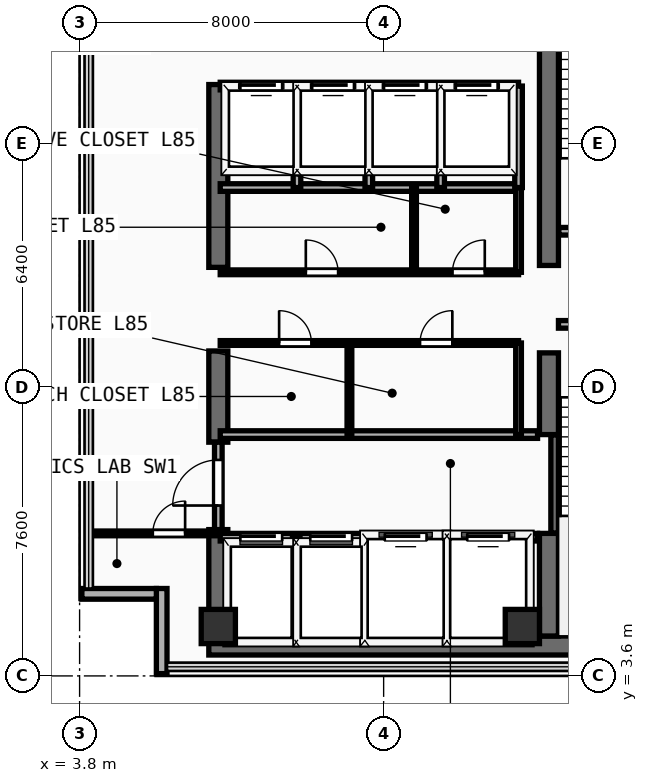
"""IFC4 building model, lengths in metres.
Left out: names, types, materials, properties, quantities, classifications, styles, units other than length and angle.
Written with IfcOpenShell. Run it as: python <this file> out.ifc"""

import sys

from ifc_helpers import new_model, si_unit, direction, frame, frame_2d, origin, origin_2d, place, context, subcontext, project, spatial, rectangle, extrude, element, fill, save


model = new_model("IFC4")
c1 = context("Model", 3, precision=1e-05, world=origin(), true_north=direction((0.0, 1.0)))
c2 = subcontext(c1, "Body", "Model", "MODEL_VIEW")
j1 = project(units=[si_unit("LENGTHUNIT", "METRE"), si_unit("PLANEANGLEUNIT", "RADIAN")], contexts=[c1])
p1 = place(None, origin())
s1 = spatial("IfcSite", under=j1, at=p1, CompositionType="ELEMENT")
p2 = place(p1, origin())
s2 = spatial("IfcBuilding", under=s1, at=p2, CompositionType="ELEMENT")
p3 = place(p2, frame((0.0, 0.0, 331.2)))
s3 = spatial("IfcBuildingStorey", under=s2, at=p3, CompositionType="ELEMENT", Elevation=331.2)
p4 = place(p3, frame((7.2, 4.4, 0.0), z_axis=(0.0, 0.0, 1.0), x_axis=(1.0, 0.0, 0.0)))
e1 = element("IfcWall", 1, at=p4, inside=s3, PredefinedType="SHEAR", context=c2, shape_type="SweptSolid", body=[
    extrude(rectangle(XDim=13.85, YDim=0.5, at=frame_2d((6.925, 0.0))), origin(), (0.0, 0.0, 1.0), 3.56),
])
p5 = place(p3, frame((7.45, 4.65, 0.0), z_axis=(0.0, 0.0, 1.0), x_axis=(0.0, 1.0, 0.0)))
e2 = element("IfcWall", 2, at=p5, inside=s3, PredefinedType="SHEAR", context=c2, shape_type="SweptSolid", body=[
    extrude(rectangle(XDim=2.8, YDim=0.5, at=frame_2d((1.4, 0.0))), origin(), (0.0, 0.0, 1.0), 3.56),
])
p6 = place(p3, frame((7.45, 9.75, 0.0), z_axis=(0.0, 0.0, 1.0), x_axis=(0.0, 1.0, 0.0)))
e3 = element("IfcWall", 3, at=p6, inside=s3, PredefinedType="SHEAR", context=c2, shape_type="SweptSolid", body=[
    extrude(rectangle(XDim=2.4, YDim=0.5, at=frame_2d((1.2, 0.0))), origin(), (0.0, 0.0, 1.0), 3.56),
])
p7 = place(p3, frame((7.45, 14.35, 0.0), z_axis=(0.0, 0.0, 1.0), x_axis=(0.0, 1.0, 0.0)))
e4 = element("IfcWall", 4, at=p7, inside=s3, PredefinedType="SHEAR", context=c2, shape_type="SweptSolid", body=[
    extrude(rectangle(XDim=4.81, YDim=0.5, at=frame_2d((2.405, 0.0))), origin(), (0.0, 0.0, 1.0), 3.56),
])
p8 = place(p3, frame((16.15, 4.65, 0.0), z_axis=(0.0, 0.0, 1.0), x_axis=(0.0, 1.0, 0.0)))
e5 = element("IfcWall", 5, at=p8, inside=s3, PredefinedType="SHEAR", context=c2, shape_type="SweptSolid", body=[
    extrude(rectangle(XDim=2.7, YDim=0.5, at=frame_2d((1.35, 0.0))), origin(), (0.0, 0.0, 1.0), 3.56),
])
p9 = place(p3, frame((16.15, 9.95, 0.0), z_axis=(0.0, 0.0, 1.0), x_axis=(0.0, 1.0, 0.0)))
e6 = element("IfcWall", 6, at=p9, inside=s3, PredefinedType="SHEAR", context=c2, shape_type="SweptSolid", body=[
    extrude(rectangle(XDim=2.15, YDim=0.5, at=frame_2d((1.075, 0.0))), origin(), (0.0, 0.0, 1.0), 3.56),
])
p10 = place(p3, frame((16.15, 14.4, 0.0), z_axis=(0.0, 0.0, 1.0), x_axis=(0.0, 1.0, 0.0)))
e7 = element("IfcWall", 7, at=p10, inside=s3, PredefinedType="SHEAR", context=c2, shape_type="SweptSolid", body=[
    extrude(rectangle(XDim=9.1, YDim=0.5, at=frame_2d((4.55, 0.0))), origin(), (0.0, 0.0, 1.0), 3.56),
])
for number, where, z_axis, x_axis in (
    (8, (7.45, 4.9, 0.0), (0.0, 0.0, 1.0), (1.0, 0.0, 0.0)),
    (9, (15.45, 4.9, 0.0), (0.0, 0.0, 1.0), (1.0, 0.0, 0.0)),
):
    element("IfcColumn", number, at=place(p3, frame(where, z_axis=z_axis, x_axis=x_axis)), inside=s3, PredefinedType="COLUMN", context=c2, shape_type="SweptSolid", body=[
        extrude(rectangle(XDim=0.9, YDim=0.9, at=origin_2d()), origin(), (0.0, 0.0, 1.0), 3.56),
    ])
p11 = place(p3, frame((5.96, 3.66, 0.0), z_axis=(0.0, 0.0, 1.0), x_axis=(0.0, 1.0, 0.0)))
e10 = element("IfcWall", 10, at=p11, inside=s3, PredefinedType="SOLIDWALL", context=c2, shape_type="SweptSolid", body=[
    extrude(rectangle(XDim=2.24, YDim=0.28, at=frame_2d((1.12, 0.0))), origin(), (0.0, 0.0, 1.0), 3.56),
])
p12 = place(p3, frame((3.86, 5.76, 0.0), z_axis=(0.0, 0.0, 1.0), x_axis=(1.0, 0.0, 0.0)))
e11 = element("IfcWall", 11, at=p12, inside=s3, PredefinedType="SOLIDWALL", context=c2, shape_type="SweptSolid", body=[
    extrude(rectangle(XDim=1.96, YDim=0.28, at=frame_2d((0.98, 0.0))), origin(), (0.0, 0.0, 1.0), 3.56),
])
p13 = place(p3, frame((16.3, 7.36, 0.0), z_axis=(0.0, 0.0, 1.0), x_axis=(0.0, 1.0, 0.0)))
e12 = element("IfcWall", 12, at=p13, inside=s3, PredefinedType="SHEAR", context=c2, shape_type="SweptSolid", body=[
    extrude(rectangle(XDim=2.58, YDim=0.2, at=frame_2d((1.29, 0.0))), origin(), (0.0, 0.0, 1.0), 3.56),
])
p14 = place(p3, frame((16.4, 12.85, 0.0), z_axis=(0.0, 0.0, 1.0), x_axis=(1.0, 0.0, 0.0)))
e13 = element("IfcWall", 13, at=p14, inside=s3, PredefinedType="PARTITIONING", context=c2, shape_type="SweptSolid", body=[
    extrude(rectangle(XDim=3.96, YDim=0.2, at=frame_2d((1.98, 0.0))), origin(), (0.0, 0.0, 1.0), 3.56),
])
p15 = place(p14, frame((1.304, 0.0, 0.0)))
e14 = element("IfcOpeningElement", 14, at=p15, cuts=e13, PredefinedType="OPENING", context=c2, shape_type="SweptSolid", body=[
    extrude(rectangle(XDim=1.1, YDim=2.2, at=frame_2d((0.55, 1.1))), frame((0.0, 0.11, 0.0), z_axis=(0.0, -1.0, 0.0), x_axis=(1.0, 0.0, 0.0)), (0.0, 0.0, 1.0), 0.22),
])
p16 = place(p3, frame((16.41, 15.3, 0.0), z_axis=(0.0, 0.0, 1.0), x_axis=(1.0, 0.0, 0.0)))
e15 = element("IfcWall", 15, at=p16, inside=s3, PredefinedType="PARTITIONING", context=c2, shape_type="SweptSolid", body=[
    extrude(rectangle(XDim=3.95, YDim=0.2, at=frame_2d((1.975, 0.0))), origin(), (0.0, 0.0, 1.0), 3.56),
])
p17 = place(p16, frame((1.294, 0.0, 0.0)))
e16 = element("IfcOpeningElement", 16, at=p17, cuts=e15, PredefinedType="OPENING", context=c2, shape_type="SweptSolid", body=[
    extrude(rectangle(XDim=1.1, YDim=2.2, at=frame_2d((0.55, 1.1))), frame((0.0, 0.11, 0.0), z_axis=(0.0, -1.0, 0.0), x_axis=(1.0, 0.0, 0.0)), (0.0, 0.0, 1.0), 0.22),
])
p18 = place(p3, frame((7.5, 7.25, 0.0), z_axis=(0.0, 0.0, 1.0), x_axis=(1.0, 0.0, 0.0)))
e17 = element("IfcWall", 17, at=p18, inside=s3, PredefinedType="PARTITIONING", context=c2, shape_type="SweptSolid", body=[
    extrude(rectangle(XDim=8.35, YDim=0.2, at=frame_2d((4.175, 0.0))), origin(), (0.0, 0.0, 1.0), 3.56),
])
p19 = place(p18, frame((0.53, 0.0, 0.0)))
e18 = element("IfcOpeningElement", 18, at=p19, cuts=e17, PredefinedType="OPENING", context=c2, shape_type="SweptSolid", body=[
    extrude(rectangle(XDim=1.1, YDim=2.2, at=frame_2d((0.55, 1.1))), frame((0.0, 0.11, 0.0), z_axis=(0.0, -1.0, 0.0), x_axis=(1.0, 0.0, 0.0)), (0.0, 0.0, 1.0), 0.22),
])
p20 = place(p18, frame((2.37, 0.0, 0.0)))
e19 = element("IfcOpeningElement", 19, at=p20, cuts=e17, PredefinedType="OPENING", context=c2, shape_type="SweptSolid", body=[
    extrude(rectangle(XDim=1.1, YDim=2.2, at=frame_2d((0.55, 1.1))), frame((0.0, 0.11, 0.0), z_axis=(0.0, -1.0, 0.0), x_axis=(1.0, 0.0, 0.0)), (0.0, 0.0, 1.0), 0.22),
])
p21 = place(p18, frame((4.33, 0.0, 0.0)))
e20 = element("IfcOpeningElement", 20, at=p21, cuts=e17, PredefinedType="OPENING", context=c2, shape_type="SweptSolid", body=[
    extrude(rectangle(XDim=1.1, YDim=2.2, at=frame_2d((0.55, 1.1))), frame((0.0, 0.11, 0.0), z_axis=(0.0, -1.0, 0.0), x_axis=(1.0, 0.0, 0.0)), (0.0, 0.0, 1.0), 0.22),
])
p22 = place(p18, frame((6.5, 0.0, 0.0)))
e21 = element("IfcOpeningElement", 21, at=p22, cuts=e17, PredefinedType="OPENING", context=c2, shape_type="SweptSolid", body=[
    extrude(rectangle(XDim=1.1, YDim=2.2, at=frame_2d((0.55, 1.1))), frame((0.0, 0.11, 0.0), z_axis=(0.0, -1.0, 0.0), x_axis=(1.0, 0.0, 0.0)), (0.0, 0.0, 1.0), 0.22),
])
p23 = place(p3, frame((7.5, 9.95, 0.0), z_axis=(0.0, 0.0, 1.0), x_axis=(1.0, 0.0, 0.0)))
e22 = element("IfcWall", 22, at=p23, inside=s3, PredefinedType="PARTITIONING", context=c2, shape_type="SweptSolid", body=[
    extrude(rectangle(XDim=8.35, YDim=0.2, at=frame_2d((4.175, 0.0))), origin(), (0.0, 0.0, 1.0), 3.56),
])
for number, where, z_axis, x_axis in (
    (23, (9.5, 4.45, 0.0), (0.0, 0.0, 1.0), (0.0, 1.0, 0.0)),
    (24, (11.36, 4.45, 0.0), (0.0, 0.0, 1.0), (0.0, 1.0, 0.0)),
    (25, (13.46, 4.45, 0.0), (0.0, 0.0, 1.0), (0.0, 1.0, 0.0)),
):
    element("IfcWall", number, at=place(p3, frame(where, z_axis=z_axis, x_axis=x_axis)), inside=s3, PredefinedType="PARTITIONING", context=c2, shape_type="SweptSolid", body=[
        extrude(rectangle(XDim=2.8, YDim=0.2, at=frame_2d((1.4, 0.0))), origin(), (0.0, 0.0, 1.0), 3.56),
    ])
p24 = place(p3, frame((7.45, 7.45, 0.0), z_axis=(0.0, 0.0, 1.0), x_axis=(0.0, 1.0, 0.0)))
e26 = element("IfcWall", 26, at=p24, inside=s3, PredefinedType="PARTITIONING", context=c2, shape_type="SweptSolid", body=[
    extrude(rectangle(XDim=2.3, YDim=0.2, at=frame_2d((1.15, 0.0))), origin(), (0.0, 0.0, 1.0), 2.54),
])
p25 = place(p24, frame((0.633, 0.0, 0.0)))
e27 = element("IfcOpeningElement", 27, at=p25, cuts=e26, PredefinedType="OPENING", context=c2, shape_type="SweptSolid", body=[
    extrude(rectangle(XDim=1.2, YDim=2.25, at=frame_2d((0.6, 1.125))), frame((0.0, 0.11, 0.0), z_axis=(0.0, -1.0, 0.0), x_axis=(1.0, 0.0, 0.0)), (0.0, 0.0, 1.0), 0.22),
])
p26 = place(p3, frame((7.5, 16.45, 0.0), z_axis=(0.0, 0.0, 1.0), x_axis=(1.0, 0.0, 0.0)))
e28 = element("IfcWall", 28, at=p26, inside=s3, PredefinedType="PARTITIONING", context=c2, shape_type="SweptSolid", body=[
    extrude(rectangle(XDim=7.85, YDim=0.2, at=frame_2d((3.925, 0.0))), origin(), (0.0, 0.0, 1.0), 3.56),
])
p27 = place(p3, frame((7.5, 12.36, 0.0), z_axis=(0.0, 0.0, 1.0), x_axis=(1.0, 0.0, 0.0)))
e29 = element("IfcWall", 29, at=p27, inside=s3, PredefinedType="PARTITIONING", context=c2, shape_type="SweptSolid", body=[
    extrude(rectangle(XDim=7.85, YDim=0.125, at=frame_2d((3.925, 0.0))), origin(), (0.0, 0.0, 1.0), 3.56),
])
p28 = place(p27, frame((1.55, 0.0, 0.0)))
e30 = element("IfcOpeningElement", 30, at=p28, cuts=e29, PredefinedType="OPENING", context=c2, shape_type="SweptSolid", body=[
    extrude(rectangle(XDim=0.85, YDim=2.15, at=frame_2d((0.425, 1.075))), frame((0.0, 0.073, 0.0), z_axis=(0.0, -1.0, 0.0), x_axis=(1.0, 0.0, 0.0)), (0.0, 0.0, 1.0), 0.145),
])
p29 = place(p27, frame((5.258, 0.0, 0.0)))
e31 = element("IfcOpeningElement", 31, at=p29, cuts=e29, PredefinedType="OPENING", context=c2, shape_type="SweptSolid", body=[
    extrude(rectangle(XDim=0.85, YDim=2.15, at=frame_2d((0.425, 1.075))), frame((0.0, 0.073, 0.0), z_axis=(0.0, -1.0, 0.0), x_axis=(1.0, 0.0, 0.0)), (0.0, 0.0, 1.0), 0.145),
])
p30 = place(p3, frame((7.5, 14.22, 0.0), z_axis=(0.0, 0.0, 1.0), x_axis=(1.0, 0.0, 0.0)))
e32 = element("IfcWall", 32, at=p30, inside=s3, PredefinedType="PARTITIONING", context=c2, shape_type="SweptSolid", body=[
    extrude(rectangle(XDim=7.85, YDim=0.125, at=frame_2d((3.925, 0.0))), origin(), (0.0, 0.0, 1.0), 3.56),
])
p31 = place(p30, frame((2.252, 0.0, 0.0)))
e33 = element("IfcOpeningElement", 33, at=p31, cuts=e32, PredefinedType="OPENING", context=c2, shape_type="SweptSolid", body=[
    extrude(rectangle(XDim=0.85, YDim=2.15, at=frame_2d((0.425, 1.075))), frame((0.0, 0.073, 0.0), z_axis=(0.0, -1.0, 0.0), x_axis=(1.0, 0.0, 0.0)), (0.0, 0.0, 1.0), 0.145),
])
p32 = place(p30, frame((6.111, 0.0, 0.0)))
e34 = element("IfcOpeningElement", 34, at=p32, cuts=e32, PredefinedType="OPENING", context=c2, shape_type="SweptSolid", body=[
    extrude(rectangle(XDim=0.85, YDim=2.15, at=frame_2d((0.425, 1.075))), frame((0.0, 0.073, 0.0), z_axis=(0.0, -1.0, 0.0), x_axis=(1.0, 0.0, 0.0)), (0.0, 0.0, 1.0), 0.145),
])
p33 = place(p3, frame((15.35, 9.95, 0.0), z_axis=(0.0, 0.0, 1.0), x_axis=(0.0, 1.0, 0.0)))
e35 = element("IfcWall", 35, at=p33, inside=s3, PredefinedType="PARTITIONING", context=c2, shape_type="SweptSolid", body=[
    extrude(rectangle(XDim=2.41, YDim=0.15, at=frame_2d((1.205, 0.0))), origin(), (0.0, 0.0, 1.0), 3.56),
])
p34 = place(p3, frame((15.35, 14.22, 0.0), z_axis=(0.0, 0.0, 1.0), x_axis=(0.0, 1.0, 0.0)))
e36 = element("IfcWall", 36, at=p34, inside=s3, PredefinedType="PARTITIONING", context=c2, shape_type="SweptSolid", body=[
    extrude(rectangle(XDim=2.23, YDim=0.15, at=frame_2d((1.115, 0.0))), origin(), (0.0, 0.0, 1.0), 3.56),
])
p35 = place(p3, frame((10.9, 9.95, 0.0), z_axis=(0.0, 0.0, 1.0), x_axis=(0.0, 1.0, 0.0)))
e37 = element("IfcWall", 37, at=p35, inside=s3, PredefinedType="PARTITIONING", context=c2, shape_type="SweptSolid", body=[
    extrude(rectangle(XDim=2.41, YDim=0.125, at=frame_2d((1.205, 0.0))), origin(), (0.0, 0.0, 1.0), 3.56),
])
p36 = place(p3, frame((12.6, 14.22, 0.0), z_axis=(0.0, 0.0, 1.0), x_axis=(0.0, 1.0, 0.0)))
e38 = element("IfcWall", 38, at=p36, inside=s3, PredefinedType="PARTITIONING", context=c2, shape_type="SweptSolid", body=[
    extrude(rectangle(XDim=2.23, YDim=0.125, at=frame_2d((1.115, 0.0))), origin(), (0.0, 0.0, 1.0), 3.56),
])
p37 = place(p3, frame((7.5, 19.12, 0.0), z_axis=(0.0, 0.0, 1.0), x_axis=(1.0, 0.0, 0.0)))
e39 = element("IfcWall", 39, at=p37, inside=s3, PredefinedType="PARTITIONING", context=c2, shape_type="SweptSolid", body=[
    extrude(rectangle(XDim=7.85, YDim=0.2, at=frame_2d((3.925, 0.0))), origin(), (0.0, 0.0, 1.0), 3.56),
])
p38 = place(p37, frame((0.53, 0.0, 0.0)))
e40 = element("IfcOpeningElement", 40, at=p38, cuts=e39, PredefinedType="OPENING", context=c2, shape_type="SweptSolid", body=[
    extrude(rectangle(XDim=1.1, YDim=2.2, at=frame_2d((0.55, 1.1))), frame((0.0, 0.11, 0.0), z_axis=(0.0, -1.0, 0.0), x_axis=(1.0, 0.0, 0.0)), (0.0, 0.0, 1.0), 0.22),
])
p39 = place(p37, frame((2.42, 0.0, 0.0)))
e41 = element("IfcOpeningElement", 41, at=p39, cuts=e39, PredefinedType="OPENING", context=c2, shape_type="SweptSolid", body=[
    extrude(rectangle(XDim=1.1, YDim=2.2, at=frame_2d((0.55, 1.1))), frame((0.0, 0.11, 0.0), z_axis=(0.0, -1.0, 0.0), x_axis=(1.0, 0.0, 0.0)), (0.0, 0.0, 1.0), 0.22),
])
p40 = place(p37, frame((4.31, 0.0, 0.0)))
e42 = element("IfcOpeningElement", 42, at=p40, cuts=e39, PredefinedType="OPENING", context=c2, shape_type="SweptSolid", body=[
    extrude(rectangle(XDim=1.1, YDim=2.2, at=frame_2d((0.55, 1.1))), frame((0.0, 0.11, 0.0), z_axis=(0.0, -1.0, 0.0), x_axis=(1.0, 0.0, 0.0)), (0.0, 0.0, 1.0), 0.22),
])
p41 = place(p37, frame((6.2, 0.0, 0.0)))
e43 = element("IfcOpeningElement", 43, at=p41, cuts=e39, PredefinedType="OPENING", context=c2, shape_type="SweptSolid", body=[
    extrude(rectangle(XDim=1.1, YDim=2.2, at=frame_2d((0.55, 1.1))), frame((0.0, 0.11, 0.0), z_axis=(0.0, -1.0, 0.0), x_axis=(1.0, 0.0, 0.0)), (0.0, 0.0, 1.0), 0.22),
])
for number, where, z_axis, x_axis in (
    (44, (15.35, 16.45, 0.0), (0.0, 0.0, 1.0), (0.0, 1.0, 0.0)),
    (45, (9.52, 16.45, 0.0), (0.0, 0.0, 1.0), (0.0, 1.0, 0.0)),
    (46, (11.41, 16.45, 0.0), (0.0, 0.0, 1.0), (0.0, 1.0, 0.0)),
    (47, (13.3, 16.45, 0.0), (0.0, 0.0, 1.0), (0.0, 1.0, 0.0)),
):
    element("IfcWall", number, at=place(p3, frame(where, z_axis=z_axis, x_axis=x_axis)), inside=s3, PredefinedType="PARTITIONING", context=c2, shape_type="SweptSolid", body=[
        extrude(rectangle(XDim=2.67, YDim=0.2, at=frame_2d((1.335, 0.0))), origin(), (0.0, 0.0, 1.0), 3.56),
    ])
p42 = place(p3, frame((4.04, 7.35, 0.0), z_axis=(0.0, 0.0, 1.0), x_axis=(1.0, 0.0, 0.0)))
e48 = element("IfcWall", 48, at=p42, inside=s3, PredefinedType="PARTITIONING", context=c2, shape_type="SweptSolid", body=[
    extrude(rectangle(XDim=3.36, YDim=0.125, at=frame_2d((1.68, 0.0))), origin(), (0.0, 0.0, 1.0), 3.56),
])
p43 = place(p42, frame((1.687, 0.0, 0.0)))
e49 = element("IfcOpeningElement", 49, at=p43, cuts=e48, PredefinedType="OPENING", context=c2, shape_type="SweptSolid", body=[
    extrude(rectangle(XDim=0.85, YDim=2.15, at=frame_2d((0.425, 1.075))), frame((0.0, 0.073, 0.0), z_axis=(0.0, -1.0, 0.0), x_axis=(1.0, 0.0, 0.0)), (0.0, 0.0, 1.0), 0.145),
])
p44 = place(p19, origin())
e50 = element("IfcDoor", 50, at=p44, inside=s3, OperationType="SLIDING_TO_LEFT", PredefinedType="DOOR", context=c2, shape_type="SweptSolid", body=[
    extrude(rectangle(XDim=1.1, YDim=2.2, at=frame_2d((0.55, 1.1))), frame((0.0, 0.025, 0.0), z_axis=(0.0, -1.0, 0.0), x_axis=(1.0, 0.0, 0.0)), (0.0, 0.0, 1.0), 0.05),
])
fill(e18, e50)
p45 = place(p20, origin())
e51 = element("IfcDoor", 51, at=p45, inside=s3, OperationType="SLIDING_TO_LEFT", PredefinedType="DOOR", context=c2, shape_type="SweptSolid", body=[
    extrude(rectangle(XDim=1.1, YDim=2.2, at=frame_2d((0.55, 1.1))), frame((0.0, 0.025, 0.0), z_axis=(0.0, -1.0, 0.0), x_axis=(1.0, 0.0, 0.0)), (0.0, 0.0, 1.0), 0.05),
])
fill(e19, e51)
p46 = place(p21, origin())
e52 = element("IfcDoor", 52, at=p46, inside=s3, OperationType="SLIDING_TO_LEFT", PredefinedType="DOOR", context=c2, shape_type="SweptSolid", body=[
    extrude(rectangle(XDim=1.1, YDim=2.2, at=frame_2d((0.55, 1.1))), frame((0.0, 0.025, 0.0), z_axis=(0.0, -1.0, 0.0), x_axis=(1.0, 0.0, 0.0)), (0.0, 0.0, 1.0), 0.05),
])
fill(e20, e52)
p47 = place(p22, origin())
e53 = element("IfcDoor", 53, at=p47, inside=s3, OperationType="SLIDING_TO_LEFT", PredefinedType="DOOR", context=c2, shape_type="SweptSolid", body=[
    extrude(rectangle(XDim=1.1, YDim=2.2, at=frame_2d((0.55, 1.1))), frame((0.0, 0.025, 0.0), z_axis=(0.0, -1.0, 0.0), x_axis=(1.0, 0.0, 0.0)), (0.0, 0.0, 1.0), 0.05),
])
fill(e21, e53)
p48 = place(p25, frame((1.2, 0.0, 0.0), z_axis=(0.0, 0.0, 1.0), x_axis=(-1.0, 0.0, 0.0)))
e54 = element("IfcDoor", 54, at=p48, inside=s3, OperationType="SINGLE_SWING_RIGHT", PredefinedType="DOOR", context=c2, shape_type="SweptSolid", body=[
    extrude(rectangle(XDim=1.2, YDim=2.25, at=frame_2d((0.6, 1.125))), frame((0.0, 0.025, 0.0), z_axis=(0.0, -1.0, 0.0), x_axis=(1.0, 0.0, 0.0)), (0.0, 0.0, 1.0), 0.05),
])
fill(e27, e54)
p49 = place(p28, origin())
e55 = element("IfcDoor", 55, at=p49, inside=s3, OperationType="SINGLE_SWING_LEFT", PredefinedType="DOOR", context=c2, shape_type="SweptSolid", body=[
    extrude(rectangle(XDim=0.85, YDim=2.15, at=frame_2d((0.425, 1.075))), frame((0.0, 0.025, 0.0), z_axis=(0.0, -1.0, 0.0), x_axis=(1.0, 0.0, 0.0)), (0.0, 0.0, 1.0), 0.05),
])
fill(e30, e55)
p50 = place(p29, origin())
e56 = element("IfcDoor", 56, at=p50, inside=s3, OperationType="SINGLE_SWING_RIGHT", PredefinedType="DOOR", context=c2, shape_type="SweptSolid", body=[
    extrude(rectangle(XDim=0.85, YDim=2.15, at=frame_2d((0.425, 1.075))), frame((0.0, 0.025, 0.0), z_axis=(0.0, -1.0, 0.0), x_axis=(1.0, 0.0, 0.0)), (0.0, 0.0, 1.0), 0.05),
])
fill(e31, e56)
p51 = place(p31, origin())
e57 = element("IfcDoor", 57, at=p51, inside=s3, OperationType="SINGLE_SWING_LEFT", PredefinedType="DOOR", context=c2, shape_type="SweptSolid", body=[
    extrude(rectangle(XDim=0.85, YDim=2.15, at=frame_2d((0.425, 1.075))), frame((0.0, 0.025, 0.0), z_axis=(0.0, -1.0, 0.0), x_axis=(1.0, 0.0, 0.0)), (0.0, 0.0, 1.0), 0.05),
])
fill(e33, e57)
p52 = place(p32, origin())
e58 = element("IfcDoor", 58, at=p52, inside=s3, OperationType="SINGLE_SWING_RIGHT", PredefinedType="DOOR", context=c2, shape_type="SweptSolid", body=[
    extrude(rectangle(XDim=0.85, YDim=2.15, at=frame_2d((0.425, 1.075))), frame((0.0, 0.025, 0.0), z_axis=(0.0, -1.0, 0.0), x_axis=(1.0, 0.0, 0.0)), (0.0, 0.0, 1.0), 0.05),
])
fill(e34, e58)
p53 = place(p38, origin())
e59 = element("IfcDoor", 59, at=p53, inside=s3, OperationType="SLIDING_TO_LEFT", PredefinedType="DOOR", context=c2, shape_type="SweptSolid", body=[
    extrude(rectangle(XDim=1.1, YDim=2.2, at=frame_2d((0.55, 1.1))), frame((0.0, 0.025, 0.0), z_axis=(0.0, -1.0, 0.0), x_axis=(1.0, 0.0, 0.0)), (0.0, 0.0, 1.0), 0.05),
])
fill(e40, e59)
p54 = place(p39, origin())
e60 = element("IfcDoor", 60, at=p54, inside=s3, OperationType="SLIDING_TO_LEFT", PredefinedType="DOOR", context=c2, shape_type="SweptSolid", body=[
    extrude(rectangle(XDim=1.1, YDim=2.2, at=frame_2d((0.55, 1.1))), frame((0.0, 0.025, 0.0), z_axis=(0.0, -1.0, 0.0), x_axis=(1.0, 0.0, 0.0)), (0.0, 0.0, 1.0), 0.05),
])
fill(e41, e60)
p55 = place(p40, origin())
e61 = element("IfcDoor", 61, at=p55, inside=s3, OperationType="SLIDING_TO_LEFT", PredefinedType="DOOR", context=c2, shape_type="SweptSolid", body=[
    extrude(rectangle(XDim=1.1, YDim=2.2, at=frame_2d((0.55, 1.1))), frame((0.0, 0.025, 0.0), z_axis=(0.0, -1.0, 0.0), x_axis=(1.0, 0.0, 0.0)), (0.0, 0.0, 1.0), 0.05),
])
fill(e42, e61)
p56 = place(p41, origin())
e62 = element("IfcDoor", 62, at=p56, inside=s3, OperationType="SLIDING_TO_LEFT", PredefinedType="DOOR", context=c2, shape_type="SweptSolid", body=[
    extrude(rectangle(XDim=1.1, YDim=2.2, at=frame_2d((0.55, 1.1))), frame((0.0, 0.025, 0.0), z_axis=(0.0, -1.0, 0.0), x_axis=(1.0, 0.0, 0.0)), (0.0, 0.0, 1.0), 0.05),
])
fill(e43, e62)
p57 = place(p43, origin())
e63 = element("IfcDoor", 63, at=p57, inside=s3, OperationType="SINGLE_SWING_RIGHT", PredefinedType="DOOR", context=c2, shape_type="SweptSolid", body=[
    extrude(rectangle(XDim=0.85, YDim=2.15, at=frame_2d((0.425, 1.075))), frame((0.0, 0.025, 0.0), z_axis=(0.0, -1.0, 0.0), x_axis=(1.0, 0.0, 0.0)), (0.0, 0.0, 1.0), 0.05),
])
fill(e49, e63)
save(model, sys.argv[1])
